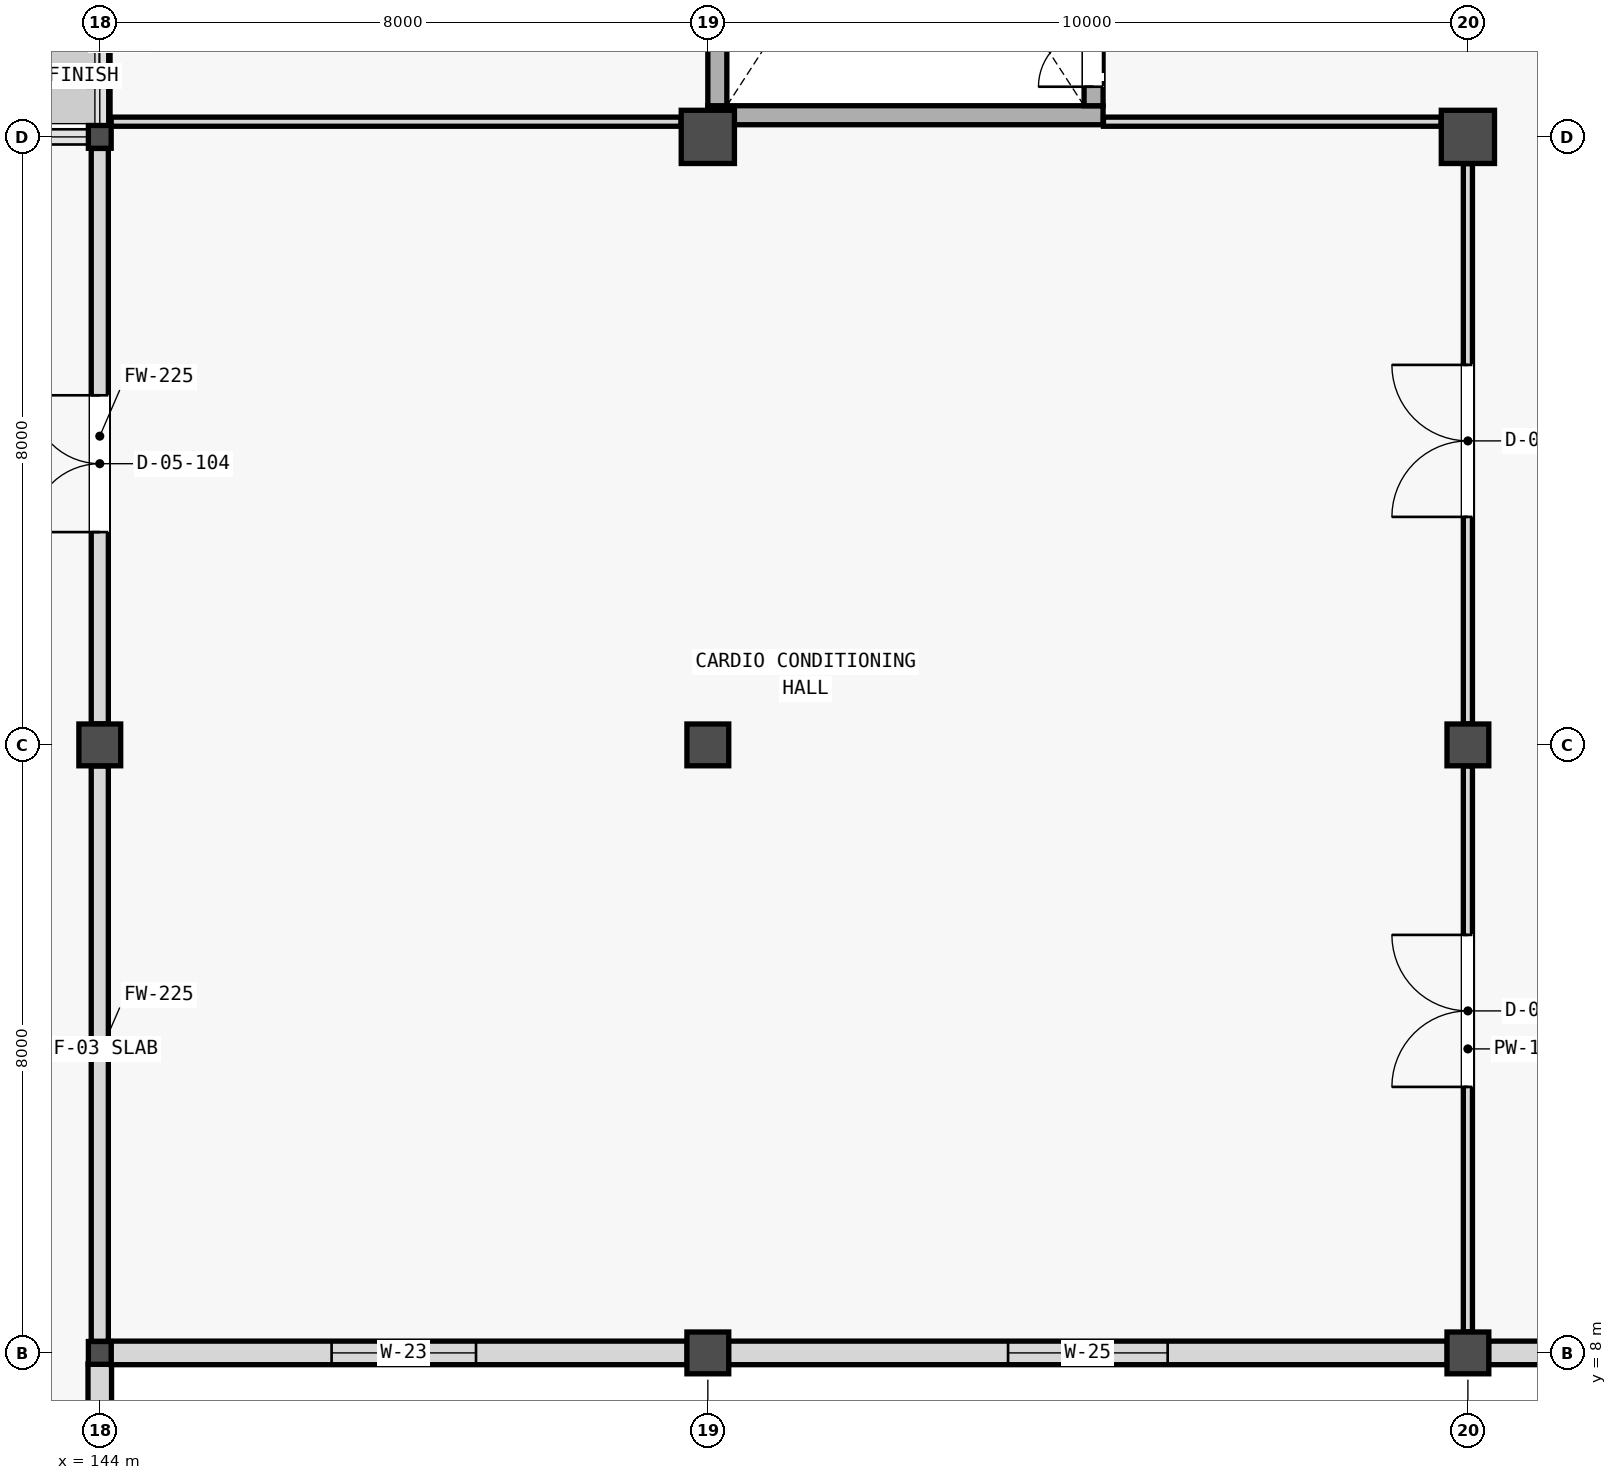
"""IFC4 building model, lengths in metres.
Left out: names, types, materials, properties, quantities, classifications, styles, units other than length and angle.
Written with IfcOpenShell. Run it as: python <this file> out.ifc"""

import sys

from ifc_helpers import new_model, si_unit, direction, frame, frame_2d, origin, origin_2d, place, context, subcontext, project, spatial, rectangle, i_section, extrude, element, fill, save


model = new_model("IFC4")
c1 = context("Model", 3, precision=1e-05, world=origin(), true_north=direction((0.0, 1.0)))
c2 = subcontext(c1, "Body", "Model", "MODEL_VIEW")
j1 = project(units=[si_unit("LENGTHUNIT", "METRE"), si_unit("PLANEANGLEUNIT", "RADIAN")], contexts=[c1])
p1 = place(None, origin())
s1 = spatial("IfcSite", under=j1, at=p1, CompositionType="ELEMENT")
p2 = place(p1, origin())
s2 = spatial("IfcBuilding", under=s1, at=p2, CompositionType="ELEMENT")
p3 = place(p2, frame((0.0, 0.0, 5.4)))
s3 = spatial("IfcBuildingStorey", under=s2, at=p3, CompositionType="ELEMENT", Elevation=5.4)
for number, where, z_axis, x_axis in (
    (1, (144.0, 8.0, 0.0), (0.0, 0.0, 1.0), (1.0, 0.0, 0.0)),
    (2, (144.0, 24.0, 0.0), (0.0, 0.0, 1.0), (1.0, 0.0, 0.0)),
):
    element("IfcColumn", number, at=place(p3, frame(where, z_axis=z_axis, x_axis=x_axis)), inside=s3, PredefinedType="COLUMN", context=c2, shape_type="SweptSolid", body=[
        extrude(i_section(OverallWidth=0.3, OverallDepth=0.3, WebThickness=0.011, FlangeThickness=0.019, at=origin_2d()), origin(), (0.0, 0.0, 1.0), 4.61),
    ])
p4 = place(p3, frame((144.0, 16.0, 0.0), z_axis=(0.0, 0.0, 1.0), x_axis=(1.0, 0.0, 0.0)))
e3 = element("IfcColumn", 3, at=p4, inside=s3, PredefinedType="COLUMN", context=c2, shape_type="SweptSolid", body=[
    extrude(rectangle(XDim=0.55, YDim=0.55, at=origin_2d()), origin(), (0.0, 0.0, 1.0), 4.61),
])
for number, where, z_axis, x_axis in (
    (4, (152.0, 8.0, 0.0), (0.0, 0.0, 1.0), (1.0, 0.0, 0.0)),
    (5, (162.0, 8.0, 0.0), (0.0, 0.0, 1.0), (1.0, 0.0, 0.0)),
    (6, (152.0, 16.0, 0.0), (0.0, 0.0, 1.0), (1.0, 0.0, 0.0)),
    (7, (162.0, 16.0, 0.0), (0.0, 0.0, 1.0), (1.0, 0.0, 0.0)),
):
    element("IfcColumn", number, at=place(p3, frame(where, z_axis=z_axis, x_axis=x_axis)), inside=s3, PredefinedType="COLUMN", context=c2, shape_type="SweptSolid", body=[
        extrude(rectangle(XDim=0.55, YDim=0.55, at=origin_2d()), origin(), (0.0, 0.0, 1.0), 4.55),
    ])
for number, where, z_axis, x_axis in (
    (8, (152.0, 24.0, 0.0), (0.0, 0.0, 1.0), (1.0, 0.0, 0.0)),
    (9, (162.0, 24.0, 0.0), (0.0, 0.0, 1.0), (1.0, 0.0, 0.0)),
):
    element("IfcColumn", number, at=place(p3, frame(where, z_axis=z_axis, x_axis=x_axis)), inside=s3, PredefinedType="COLUMN", context=c2, shape_type="SweptSolid", body=[
        extrude(rectangle(XDim=0.7, YDim=0.7, at=origin_2d()), origin(), (0.0, 0.0, 1.0), 4.55),
    ])
p5 = place(p3, frame((144.0, 0.321, 0.0), z_axis=(0.0, 0.0, 1.0), x_axis=(0.0, 1.0, 0.0)))
e10 = element("IfcWall", 10, at=p5, inside=s3, PredefinedType="STANDARD", context=c2, shape_type="SweptSolid", body=[
    extrude(rectangle(XDim=7.533, YDim=0.31, at=frame_2d((3.767, 0.0))), origin(), (0.0, 0.0, 1.0), 3.57),
])
p6 = place(p3, frame((144.0, 24.146, 0.0), z_axis=(0.0, 0.0, 1.0), x_axis=(0.0, 1.0, 0.0)))
e11 = element("IfcWall", 11, at=p6, inside=s3, PredefinedType="STANDARD", context=c2, shape_type="SweptSolid", body=[
    extrude(rectangle(XDim=7.583, YDim=0.27, at=frame_2d((3.792, 0.0))), origin(), (0.0, 0.0, 1.0), 0.8),
])
p7 = place(p3, frame((144.146, 8.0, 0.0), z_axis=(0.0, 0.0, 1.0), x_axis=(1.0, 0.0, 0.0)))
e12 = element("IfcWall", 12, at=p7, inside=s3, PredefinedType="STANDARD", context=c2, shape_type="SweptSolid", body=[
    extrude(rectangle(XDim=7.583, YDim=0.31, at=frame_2d((3.792, 0.0))), origin(), (0.0, 0.0, 1.0), 3.57),
])
p8 = place(p7, frame((2.904, 0.0, 0.95)))
e13 = element("IfcOpeningElement", 13, at=p8, cuts=e12, PredefinedType="OPENING", context=c2, shape_type="SweptSolid", body=[
    extrude(rectangle(XDim=1.9, YDim=1.45, at=frame_2d((0.95, 0.725))), frame((0.0, 0.165, 0.0), z_axis=(0.0, -1.0, 0.0), x_axis=(1.0, 0.0, 0.0)), (0.0, 0.0, 1.0), 0.33),
])
p9 = place(p3, frame((152.271, 8.0, 0.0), z_axis=(0.0, 0.0, 1.0), x_axis=(1.0, 0.0, 0.0)))
e14 = element("IfcWall", 14, at=p9, inside=s3, PredefinedType="STANDARD", context=c2, shape_type="SweptSolid", body=[
    extrude(rectangle(XDim=9.458, YDim=0.31, at=frame_2d((4.729, 0.0))), origin(), (0.0, 0.0, 1.0), 3.65),
])
p10 = place(p9, frame((3.679, 0.0, 0.95)))
e15 = element("IfcOpeningElement", 15, at=p10, cuts=e14, PredefinedType="OPENING", context=c2, shape_type="SweptSolid", body=[
    extrude(rectangle(XDim=2.1, YDim=1.5, at=frame_2d((1.05, 0.75))), frame((0.0, 0.165, 0.0), z_axis=(0.0, -1.0, 0.0), x_axis=(1.0, 0.0, 0.0)), (0.0, 0.0, 1.0), 0.33),
])
p11 = place(p3, frame((162.271, 8.0, 0.0), z_axis=(0.0, 0.0, 1.0), x_axis=(1.0, 0.0, 0.0)))
e16 = element("IfcWall", 16, at=p11, inside=s3, PredefinedType="STANDARD", context=c2, shape_type="SweptSolid", body=[
    extrude(rectangle(XDim=5.749, YDim=0.31, at=frame_2d((2.875, 0.0))), origin(), (0.0, 0.0, 1.0), 3.65),
])
p12 = place(p11, frame((0.759, 0.0, 0.95)))
e17 = element("IfcOpeningElement", 17, at=p12, cuts=e16, PredefinedType="OPENING", context=c2, shape_type="SweptSolid", body=[
    extrude(rectangle(XDim=1.0, YDim=1.6, at=frame_2d((0.5, 0.8))), frame((0.0, 0.165, 0.0), z_axis=(0.0, -1.0, 0.0), x_axis=(1.0, 0.0, 0.0)), (0.0, 0.0, 1.0), 0.33),
])
p13 = place(p3, frame((152.0, 24.285, 0.0), z_axis=(0.0, 0.0, 1.0), x_axis=(1.0, 0.0, 0.0)))
e18 = element("IfcWall", 18, at=p13, inside=s3, PredefinedType="SHEAR", context=c2, shape_type="SweptSolid", body=[
    extrude(rectangle(XDim=5.2, YDim=0.25, at=frame_2d((2.6, 0.0))), origin(), (0.0, 0.0, 1.0), 4.8),
])
p14 = place(p3, frame((152.125, 24.41, 0.0), z_axis=(0.0, 0.0, 1.0), x_axis=(0.0, 1.0, 0.0)))
e19 = element("IfcWall", 19, at=p14, inside=s3, PredefinedType="SHEAR", context=c2, shape_type="SweptSolid", body=[
    extrude(rectangle(XDim=7.24, YDim=0.25, at=frame_2d((3.62, 0.0))), origin(), (0.0, 0.0, 1.0), 4.8),
])
p15 = place(p3, frame((157.075, 24.41, 0.0), z_axis=(0.0, 0.0, 1.0), x_axis=(0.0, 1.0, 0.0)))
e20 = element("IfcWall", 20, at=p15, inside=s3, PredefinedType="SHEAR", context=c2, shape_type="SweptSolid", body=[
    extrude(rectangle(XDim=7.24, YDim=0.25, at=frame_2d((3.62, 0.0))), origin(), (0.0, 0.0, 1.0), 4.8),
])
p16 = place(p15, frame((0.25, 0.0, 0.0)))
e21 = element("IfcOpeningElement", 21, at=p16, cuts=e20, PredefinedType="OPENING", context=c2, shape_type="SweptSolid", body=[
    extrude(rectangle(XDim=1.45, YDim=2.2, at=frame_2d((0.725, 1.1))), frame((0.0, 0.135, 0.0), z_axis=(0.0, -1.0, 0.0), x_axis=(1.0, 0.0, 0.0)), (0.0, 0.0, 1.0), 0.27),
])
p17 = place(p3, frame((144.0, 8.152, 0.0), z_axis=(0.0, 0.0, 1.0), x_axis=(0.0, 1.0, 0.0)))
e22 = element("IfcWall", 22, at=p17, inside=s3, PredefinedType="STANDARD", context=c2, shape_type="SweptSolid", body=[
    extrude(rectangle(XDim=7.571, YDim=0.225, at=frame_2d((3.785, 0.0))), origin(), (0.0, 0.0, 1.0), 3.57),
])
p18 = place(p3, frame((144.0, 16.277, 0.0), z_axis=(0.0, 0.0, 1.0), x_axis=(0.0, 1.0, 0.0)))
e23 = element("IfcWall", 23, at=p18, inside=s3, PredefinedType="STANDARD", context=c2, shape_type="SweptSolid", body=[
    extrude(rectangle(XDim=7.571, YDim=0.225, at=frame_2d((3.785, 0.0))), origin(), (0.0, 0.0, 1.0), 3.57),
])
p19 = place(p18, frame((2.523, 0.0, 0.0)))
e24 = element("IfcOpeningElement", 24, at=p19, cuts=e23, PredefinedType="OPENING", context=c2, shape_type="SweptSolid", body=[
    extrude(rectangle(XDim=1.8, YDim=2.3, at=frame_2d((0.9, 1.15))), frame((0.0, 0.123, 0.0), z_axis=(0.0, -1.0, 0.0), x_axis=(1.0, 0.0, 0.0)), (0.0, 0.0, 1.0), 0.245),
])
p20 = place(p3, frame((162.0, 8.277, 0.0), z_axis=(0.0, 0.0, 1.0), x_axis=(0.0, 1.0, 0.0)))
e25 = element("IfcWall", 25, at=p20, inside=s3, PredefinedType="PARTITIONING", context=c2, shape_type="SweptSolid", body=[
    extrude(rectangle(XDim=7.446, YDim=0.12, at=frame_2d((3.723, 0.0))), origin(), (0.0, 0.0, 1.0), 3.83),
])
p21 = place(p20, frame((3.223, 0.0, 0.0)))
e26 = element("IfcOpeningElement", 26, at=p21, cuts=e25, PredefinedType="OPENING", context=c2, shape_type="SweptSolid", body=[
    extrude(rectangle(XDim=2.0, YDim=2.4, at=frame_2d((1.0, 1.2))), frame((0.0, 0.07, 0.0), z_axis=(0.0, -1.0, 0.0), x_axis=(1.0, 0.0, 0.0)), (0.0, 0.0, 1.0), 0.14),
])
p22 = place(p3, frame((162.0, 16.277, 0.0), z_axis=(0.0, 0.0, 1.0), x_axis=(0.0, 1.0, 0.0)))
e27 = element("IfcWall", 27, at=p22, inside=s3, PredefinedType="PARTITIONING", context=c2, shape_type="SweptSolid", body=[
    extrude(rectangle(XDim=7.371, YDim=0.12, at=frame_2d((3.686, 0.0))), origin(), (0.0, 0.0, 1.0), 3.83),
])
p23 = place(p22, frame((2.723, 0.0, 0.0)))
e28 = element("IfcOpeningElement", 28, at=p23, cuts=e27, PredefinedType="OPENING", context=c2, shape_type="SweptSolid", body=[
    extrude(rectangle(XDim=2.0, YDim=2.4, at=frame_2d((1.0, 1.2))), frame((0.0, 0.07, 0.0), z_axis=(0.0, -1.0, 0.0), x_axis=(1.0, 0.0, 0.0)), (0.0, 0.0, 1.0), 0.14),
])
p24 = place(p3, frame((144.15, 24.2, 0.0), z_axis=(0.0, 0.0, 1.0), x_axis=(1.0, 0.0, 0.0)))
e29 = element("IfcWall", 29, at=p24, inside=s3, PredefinedType="PARTITIONING", context=c2, shape_type="SweptSolid", body=[
    extrude(rectangle(XDim=7.498, YDim=0.12, at=frame_2d((3.749, 0.0))), origin(), (0.0, 0.0, 1.0), 3.78),
])
p25 = place(p3, frame((157.205, 24.2, 0.0), z_axis=(0.0, 0.0, 1.0), x_axis=(1.0, 0.0, 0.0)))
e30 = element("IfcWall", 30, at=p25, inside=s3, PredefinedType="PARTITIONING", context=c2, shape_type="SweptSolid", body=[
    extrude(rectangle(XDim=4.443, YDim=0.12, at=frame_2d((2.221, 0.0))), origin(), (0.0, 0.0, 1.0), 3.68),
])
p26 = place(p8, origin())
e31 = element("IfcWindow", 31, at=p26, inside=s3, PartitioningType="SINGLE_PANEL", PredefinedType="WINDOW", context=c2, shape_type="SweptSolid", body=[
    extrude(rectangle(XDim=1.9, YDim=1.45, at=frame_2d((0.95, 0.725))), frame((0.0, 0.03, 0.0), z_axis=(0.0, -1.0, 0.0), x_axis=(1.0, 0.0, 0.0)), (0.0, 0.0, 1.0), 0.06),
])
fill(e13, e31)
p27 = place(p10, origin())
e32 = element("IfcWindow", 32, at=p27, inside=s3, PartitioningType="SINGLE_PANEL", PredefinedType="WINDOW", context=c2, shape_type="SweptSolid", body=[
    extrude(rectangle(XDim=2.1, YDim=1.5, at=frame_2d((1.05, 0.75))), frame((0.0, 0.03, 0.0), z_axis=(0.0, -1.0, 0.0), x_axis=(1.0, 0.0, 0.0)), (0.0, 0.0, 1.0), 0.06),
])
fill(e15, e32)
p28 = place(p16, origin())
e33 = element("IfcDoor", 33, at=p28, inside=s3, OperationType="DOUBLE_DOOR_SINGLE_SWING", PredefinedType="DOOR", context=c2, shape_type="SweptSolid", body=[
    extrude(rectangle(XDim=1.45, YDim=2.2, at=frame_2d((0.725, 1.1))), frame((0.0, 0.025, 0.0), z_axis=(0.0, -1.0, 0.0), x_axis=(1.0, 0.0, 0.0)), (0.0, 0.0, 1.0), 0.05),
])
fill(e21, e33)
p29 = place(p19, origin())
e34 = element("IfcDoor", 34, at=p29, inside=s3, OperationType="DOUBLE_DOOR_SINGLE_SWING", PredefinedType="DOOR", context=c2, shape_type="SweptSolid", body=[
    extrude(rectangle(XDim=1.8, YDim=2.3, at=frame_2d((0.9, 1.15))), frame((0.0, 0.025, 0.0), z_axis=(0.0, -1.0, 0.0), x_axis=(1.0, 0.0, 0.0)), (0.0, 0.0, 1.0), 0.05),
])
fill(e24, e34)
p30 = place(p21, origin())
e35 = element("IfcDoor", 35, at=p30, inside=s3, OperationType="DOUBLE_DOOR_SINGLE_SWING", PredefinedType="DOOR", context=c2, shape_type="SweptSolid", body=[
    extrude(rectangle(XDim=2.0, YDim=2.4, at=frame_2d((1.0, 1.2))), frame((0.0, 0.025, 0.0), z_axis=(0.0, -1.0, 0.0), x_axis=(1.0, 0.0, 0.0)), (0.0, 0.0, 1.0), 0.05),
])
fill(e26, e35)
p31 = place(p23, origin())
e36 = element("IfcDoor", 36, at=p31, inside=s3, OperationType="DOUBLE_DOOR_SINGLE_SWING", PredefinedType="DOOR", context=c2, shape_type="SweptSolid", body=[
    extrude(rectangle(XDim=2.0, YDim=2.4, at=frame_2d((1.0, 1.2))), frame((0.0, 0.025, 0.0), z_axis=(0.0, -1.0, 0.0), x_axis=(1.0, 0.0, 0.0)), (0.0, 0.0, 1.0), 0.05),
])
fill(e28, e36)
save(model, sys.argv[1])
